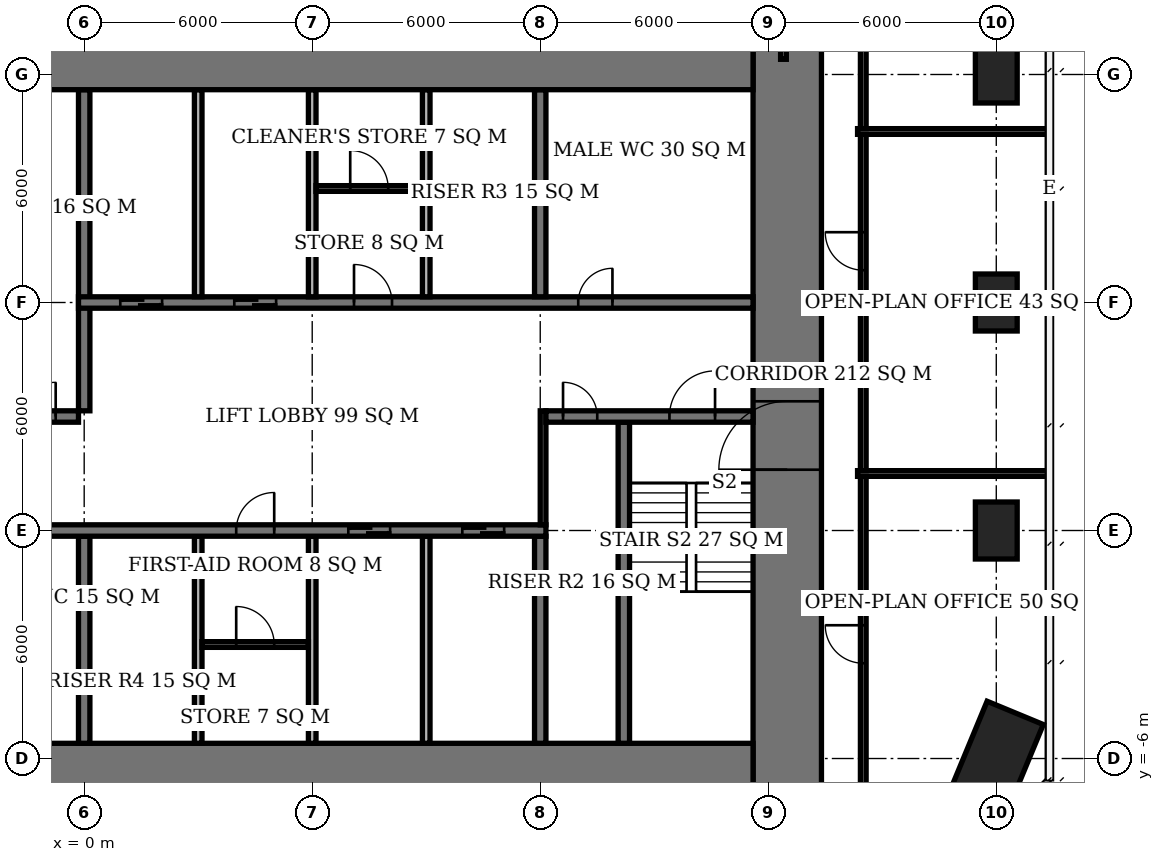
"""IFC4 building model, lengths in metres.
Left out: names, types, materials, properties, quantities, classifications, styles, units other than length and angle.
Written with IfcOpenShell. Run it as: python <this file> out.ifc"""

import sys

from ifc_helpers import new_model, si_unit, direction, frame, frame_2d, origin, origin_2d, place, context, subcontext, project, spatial, rectangle, extrude, element, fill, save


model = new_model("IFC4")
c1 = context("Model", 3, precision=1e-05, world=origin(), true_north=direction((0.0, 1.0)))
c2 = subcontext(c1, "Body", "Model", "MODEL_VIEW")
j1 = project(units=[si_unit("LENGTHUNIT", "METRE"), si_unit("PLANEANGLEUNIT", "RADIAN")], contexts=[c1])
p1 = place(None, origin())
s1 = spatial("IfcSite", under=j1, at=p1, CompositionType="ELEMENT")
p2 = place(p1, origin())
s2 = spatial("IfcBuilding", under=s1, at=p2, CompositionType="ELEMENT")
p3 = place(p2, frame((0.0, 0.0, 204.5)))
s3 = spatial("IfcBuildingStorey", under=s2, at=p3, CompositionType="ELEMENT", Elevation=204.5)
p4 = place(p3, frame((24.0, -6.0, 0.0), z_axis=(0.0, 0.0, 1.0), x_axis=(-0.382683432365, -0.923879532511, 0.0)))
e1 = element("IfcColumn", 1, at=p4, inside=s3, PredefinedType="COLUMN", context=c2, shape_type="SweptSolid", body=[
    extrude(rectangle(XDim=2.6, YDim=1.6, at=origin_2d()), origin(), (0.0, 0.0, 1.0), 3.9),
])
for number, where, z_axis, x_axis in (
    (2, (24.0, 0.0, 0.0), (0.0, 0.0, 1.0), (0.0, 1.0, 0.0)),
    (3, (24.0, 6.0, 0.0), (0.0, 0.0, 1.0), (0.0, 1.0, 0.0)),
    (4, (24.0, 12.0, 0.0), (0.0, 0.0, 1.0), (0.0, 1.0, 0.0)),
):
    element("IfcColumn", number, at=place(p3, frame(where, z_axis=z_axis, x_axis=x_axis)), inside=s3, PredefinedType="COLUMN", context=c2, shape_type="SweptSolid", body=[
        extrude(rectangle(XDim=1.5, YDim=1.1, at=origin_2d()), origin(), (0.0, 0.0, 1.0), 3.9),
    ])
for number, where, z_axis, x_axis in (
    (5, (-5.6, -6.6, 0.0), (0.0, 0.0, 1.0), (1.0, 0.0, 0.0)),
    (6, (-5.6, 12.6, 0.0), (0.0, 0.0, 1.0), (1.0, 0.0, 0.0)),
):
    element("IfcWall", number, at=place(p3, frame(where, z_axis=z_axis, x_axis=x_axis)), inside=s3, PredefinedType="SHEAR", context=c2, shape_type="SweptSolid", body=[
        extrude(rectangle(XDim=23.2, YDim=2.0, at=frame_2d((11.6, 0.0))), origin(), (0.0, 0.0, 1.0), 3.9),
    ])
p5 = place(p3, frame((18.5, -7.6, 0.0), z_axis=(0.0, 0.0, 1.0), x_axis=(0.0, 1.0, 0.0)))
e7 = element("IfcWall", 7, at=p5, inside=s3, PredefinedType="SHEAR", context=c2, shape_type="SweptSolid", body=[
    extrude(rectangle(XDim=21.2, YDim=1.8, at=frame_2d((10.6, 0.0))), origin(), (0.0, 0.0, 1.0), 3.9),
])
p6 = place(p5, frame((9.2, 0.0, 0.0)))
e8 = element("IfcOpeningElement", 8, at=p6, cuts=e7, PredefinedType="OPENING", context=c2, shape_type="SweptSolid", body=[
    extrude(rectangle(XDim=1.8, YDim=2.4, at=frame_2d((0.9, 1.2))), frame((0.0, 0.91, 0.0), z_axis=(0.0, -1.0, 0.0), x_axis=(1.0, 0.0, 0.0)), (0.0, 0.0, 1.0), 1.82),
])
p7 = place(p3, frame((-5.6, 0.0, 0.0), z_axis=(0.0, 0.0, 1.0), x_axis=(1.0, 0.0, 0.0)))
e9 = element("IfcWall", 9, at=p7, inside=s3, PredefinedType="SHEAR", context=c2, shape_type="SweptSolid", body=[
    extrude(rectangle(XDim=17.75, YDim=0.3, at=frame_2d((8.875, 0.0))), origin(), (0.0, 0.0, 1.0), 3.9),
])
p8 = place(p7, frame((0.6, 0.0, 0.0)))
e10 = element("IfcOpeningElement", 10, at=p8, cuts=e9, PredefinedType="OPENING", context=c2, shape_type="SweptSolid", body=[
    extrude(rectangle(XDim=0.9, YDim=2.1, at=frame_2d((0.45, 1.05))), frame((0.0, 0.16, 0.0), z_axis=(0.0, -1.0, 0.0), x_axis=(1.0, 0.0, 0.0)), (0.0, 0.0, 1.0), 0.32),
])
p9 = place(p7, frame((3.7, 0.0, 0.0)))
e11 = element("IfcOpeningElement", 11, at=p9, cuts=e9, PredefinedType="OPENING", context=c2, shape_type="SweptSolid", body=[
    extrude(rectangle(XDim=1.0, YDim=2.1, at=frame_2d((0.5, 1.05))), frame((0.0, 0.16, 0.0), z_axis=(0.0, -1.0, 0.0), x_axis=(1.0, 0.0, 0.0)), (0.0, 0.0, 1.0), 0.32),
])
p10 = place(p7, frame((9.6, 0.0, 0.0)))
e12 = element("IfcOpeningElement", 12, at=p10, cuts=e9, PredefinedType="OPENING", context=c2, shape_type="SweptSolid", body=[
    extrude(rectangle(XDim=1.0, YDim=2.1, at=frame_2d((0.5, 1.05))), frame((0.0, 0.16, 0.0), z_axis=(0.0, -1.0, 0.0), x_axis=(1.0, 0.0, 0.0)), (0.0, 0.0, 1.0), 0.32),
])
p11 = place(p7, frame((12.55, 0.0, 0.0)))
e13 = element("IfcOpeningElement", 13, at=p11, cuts=e9, PredefinedType="OPENING", context=c2, shape_type="SweptSolid", body=[
    extrude(rectangle(XDim=1.1, YDim=2.1, at=frame_2d((0.55, 1.05))), frame((0.0, 0.16, 0.0), z_axis=(0.0, -1.0, 0.0), x_axis=(1.0, 0.0, 0.0)), (0.0, 0.0, 1.0), 0.32),
])
p12 = place(p7, frame((15.55, 0.0, 0.0)))
e14 = element("IfcOpeningElement", 14, at=p12, cuts=e9, PredefinedType="OPENING", context=c2, shape_type="SweptSolid", body=[
    extrude(rectangle(XDim=1.1, YDim=2.1, at=frame_2d((0.55, 1.05))), frame((0.0, 0.16, 0.0), z_axis=(0.0, -1.0, 0.0), x_axis=(1.0, 0.0, 0.0)), (0.0, 0.0, 1.0), 0.32),
])
p13 = place(p3, frame((-5.6, 3.0, 0.0), z_axis=(0.0, 0.0, 1.0), x_axis=(1.0, 0.0, 0.0)))
e15 = element("IfcWall", 15, at=p13, inside=s3, PredefinedType="SHEAR", context=c2, shape_type="SweptSolid", body=[
    extrude(rectangle(XDim=5.45, YDim=0.3, at=frame_2d((2.725, 0.0))), origin(), (0.0, 0.0, 1.0), 3.9),
])
p14 = place(p13, frame((0.4, 0.0, 0.0)))
e16 = element("IfcOpeningElement", 16, at=p14, cuts=e15, PredefinedType="OPENING", context=c2, shape_type="SweptSolid", body=[
    extrude(rectangle(XDim=1.2, YDim=2.1, at=frame_2d((0.6, 1.05))), frame((0.0, 0.16, 0.0), z_axis=(0.0, -1.0, 0.0), x_axis=(1.0, 0.0, 0.0)), (0.0, 0.0, 1.0), 0.32),
])
p15 = place(p13, frame((3.95, 0.0, 0.0)))
e17 = element("IfcOpeningElement", 17, at=p15, cuts=e15, PredefinedType="OPENING", context=c2, shape_type="SweptSolid", body=[
    extrude(rectangle(XDim=0.9, YDim=2.1, at=frame_2d((0.45, 1.05))), frame((0.0, 0.16, 0.0), z_axis=(0.0, -1.0, 0.0), x_axis=(1.0, 0.0, 0.0)), (0.0, 0.0, 1.0), 0.32),
])
p16 = place(p3, frame((12.15, 3.0, 0.0), z_axis=(0.0, 0.0, 1.0), x_axis=(1.0, 0.0, 0.0)))
e18 = element("IfcWall", 18, at=p16, inside=s3, PredefinedType="SHEAR", context=c2, shape_type="SweptSolid", body=[
    extrude(rectangle(XDim=5.45, YDim=0.3, at=frame_2d((2.725, 0.0))), origin(), (0.0, 0.0, 1.0), 3.9),
])
p17 = place(p16, frame((3.25, 0.0, 0.0)))
e19 = element("IfcOpeningElement", 19, at=p17, cuts=e18, PredefinedType="OPENING", context=c2, shape_type="SweptSolid", body=[
    extrude(rectangle(XDim=1.2, YDim=2.1, at=frame_2d((0.6, 1.05))), frame((0.0, 0.16, 0.0), z_axis=(0.0, -1.0, 0.0), x_axis=(1.0, 0.0, 0.0)), (0.0, 0.0, 1.0), 0.32),
])
p18 = place(p16, frame((0.45, 0.0, 0.0)))
e20 = element("IfcOpeningElement", 20, at=p18, cuts=e18, PredefinedType="OPENING", context=c2, shape_type="SweptSolid", body=[
    extrude(rectangle(XDim=0.9, YDim=2.1, at=frame_2d((0.45, 1.05))), frame((0.0, 0.16, 0.0), z_axis=(0.0, -1.0, 0.0), x_axis=(1.0, 0.0, 0.0)), (0.0, 0.0, 1.0), 0.32),
])
p19 = place(p3, frame((-0.15, 6.0, 0.0), z_axis=(0.0, 0.0, 1.0), x_axis=(1.0, 0.0, 0.0)))
e21 = element("IfcWall", 21, at=p19, inside=s3, PredefinedType="SHEAR", context=c2, shape_type="SweptSolid", body=[
    extrude(rectangle(XDim=17.75, YDim=0.3, at=frame_2d((8.875, 0.0))), origin(), (0.0, 0.0, 1.0), 3.9),
])
p20 = place(p19, frame((13.15, 0.0, 0.0)))
e22 = element("IfcOpeningElement", 22, at=p20, cuts=e21, PredefinedType="OPENING", context=c2, shape_type="SweptSolid", body=[
    extrude(rectangle(XDim=0.9, YDim=2.1, at=frame_2d((0.45, 1.05))), frame((0.0, 0.16, 0.0), z_axis=(0.0, -1.0, 0.0), x_axis=(1.0, 0.0, 0.0)), (0.0, 0.0, 1.0), 0.32),
])
p21 = place(p19, frame((7.25, 0.0, 0.0)))
e23 = element("IfcOpeningElement", 23, at=p21, cuts=e21, PredefinedType="OPENING", context=c2, shape_type="SweptSolid", body=[
    extrude(rectangle(XDim=1.0, YDim=2.1, at=frame_2d((0.5, 1.05))), frame((0.0, 0.16, 0.0), z_axis=(0.0, -1.0, 0.0), x_axis=(1.0, 0.0, 0.0)), (0.0, 0.0, 1.0), 0.32),
])
p22 = place(p19, frame((1.1, 0.0, 0.0)))
e24 = element("IfcOpeningElement", 24, at=p22, cuts=e21, PredefinedType="OPENING", context=c2, shape_type="SweptSolid", body=[
    extrude(rectangle(XDim=1.1, YDim=2.1, at=frame_2d((0.55, 1.05))), frame((0.0, 0.16, 0.0), z_axis=(0.0, -1.0, 0.0), x_axis=(1.0, 0.0, 0.0)), (0.0, 0.0, 1.0), 0.32),
])
p23 = place(p19, frame((4.1, 0.0, 0.0)))
e25 = element("IfcOpeningElement", 25, at=p23, cuts=e21, PredefinedType="OPENING", context=c2, shape_type="SweptSolid", body=[
    extrude(rectangle(XDim=1.1, YDim=2.1, at=frame_2d((0.55, 1.05))), frame((0.0, 0.16, 0.0), z_axis=(0.0, -1.0, 0.0), x_axis=(1.0, 0.0, 0.0)), (0.0, 0.0, 1.0), 0.32),
])
p24 = place(p3, frame((0.0, -5.6, 0.0), z_axis=(0.0, 0.0, 1.0), x_axis=(0.0, 1.0, 0.0)))
e26 = element("IfcWall", 26, at=p24, inside=s3, PredefinedType="SHEAR", context=c2, shape_type="SweptSolid", body=[
    extrude(rectangle(XDim=5.45, YDim=0.3, at=frame_2d((2.725, 0.0))), origin(), (0.0, 0.0, 1.0), 3.9),
])
p25 = place(p3, frame((0.0, 3.15, 0.0), z_axis=(0.0, 0.0, 1.0), x_axis=(0.0, 1.0, 0.0)))
e27 = element("IfcWall", 27, at=p25, inside=s3, PredefinedType="SHEAR", context=c2, shape_type="SweptSolid", body=[
    extrude(rectangle(XDim=8.45, YDim=0.3, at=frame_2d((4.225, 0.0))), origin(), (0.0, 0.0, 1.0), 3.9),
])
for number, where, z_axis, x_axis in (
    (28, (12.0, -5.6, 0.0), (0.0, 0.0, 1.0), (0.0, 1.0, 0.0)),
    (29, (12.0, 6.15, 0.0), (0.0, 0.0, 1.0), (0.0, 1.0, 0.0)),
):
    element("IfcWall", number, at=place(p3, frame(where, z_axis=z_axis, x_axis=x_axis)), inside=s3, PredefinedType="SHEAR", context=c2, shape_type="SweptSolid", body=[
        extrude(rectangle(XDim=5.45, YDim=0.3, at=frame_2d((2.725, 0.0))), origin(), (0.0, 0.0, 1.0), 3.9),
    ])
p26 = place(p3, frame((14.2, -5.6, 0.0), z_axis=(0.0, 0.0, 1.0), x_axis=(0.0, 1.0, 0.0)))
e30 = element("IfcWall", 30, at=p26, inside=s3, PredefinedType="SHEAR", context=c2, shape_type="SweptSolid", body=[
    extrude(rectangle(XDim=8.45, YDim=0.3, at=frame_2d((4.225, 0.0))), origin(), (0.0, 0.0, 1.0), 3.9),
])
for number, where, z_axis, x_axis in (
    (31, (3.0, 6.15, 0.0), (0.0, 0.0, 1.0), (0.0, 1.0, 0.0)),
    (32, (6.0, 6.15, 0.0), (0.0, 0.0, 1.0), (0.0, 1.0, 0.0)),
    (33, (9.0, 6.15, 0.0), (0.0, 0.0, 1.0), (0.0, 1.0, 0.0)),
    (34, (3.0, -5.6, 0.0), (0.0, 0.0, 1.0), (0.0, 1.0, 0.0)),
    (35, (6.0, -5.6, 0.0), (0.0, 0.0, 1.0), (0.0, 1.0, 0.0)),
    (36, (9.0, -5.6, 0.0), (0.0, 0.0, 1.0), (0.0, 1.0, 0.0)),
):
    element("IfcWall", number, at=place(p3, frame(where, z_axis=z_axis, x_axis=x_axis)), inside=s3, PredefinedType="SOLIDWALL", context=c2, shape_type="SweptSolid", body=[
        extrude(rectangle(XDim=5.45, YDim=0.2, at=frame_2d((2.725, 0.0))), origin(), (0.0, 0.0, 1.0), 3.9),
    ])
p27 = place(p3, frame((6.1, 9.0, 0.0), z_axis=(0.0, 0.0, 1.0), x_axis=(1.0, 0.0, 0.0)))
e37 = element("IfcWall", 37, at=p27, inside=s3, PredefinedType="PARTITIONING", context=c2, shape_type="SweptSolid", body=[
    extrude(rectangle(XDim=2.8, YDim=0.15, at=frame_2d((1.4, 0.0))), origin(), (0.0, 0.0, 1.0), 3.65),
])
p28 = place(p27, frame((0.9, 0.0, 0.0)))
e38 = element("IfcOpeningElement", 38, at=p28, cuts=e37, PredefinedType="OPENING", context=c2, shape_type="SweptSolid", body=[
    extrude(rectangle(XDim=1.0, YDim=2.1, at=frame_2d((0.5, 1.05))), frame((0.0, 0.085, 0.0), z_axis=(0.0, -1.0, 0.0), x_axis=(1.0, 0.0, 0.0)), (0.0, 0.0, 1.0), 0.17),
])
p29 = place(p3, frame((3.1, -3.0, 0.0), z_axis=(0.0, 0.0, 1.0), x_axis=(1.0, 0.0, 0.0)))
e39 = element("IfcWall", 39, at=p29, inside=s3, PredefinedType="PARTITIONING", context=c2, shape_type="SweptSolid", body=[
    extrude(rectangle(XDim=2.8, YDim=0.15, at=frame_2d((1.4, 0.0))), origin(), (0.0, 0.0, 1.0), 3.65),
])
p30 = place(p29, frame((0.9, 0.0, 0.0)))
e40 = element("IfcOpeningElement", 40, at=p30, cuts=e39, PredefinedType="OPENING", context=c2, shape_type="SweptSolid", body=[
    extrude(rectangle(XDim=1.0, YDim=2.1, at=frame_2d((0.5, 1.05))), frame((0.0, 0.085, 0.0), z_axis=(0.0, -1.0, 0.0), x_axis=(1.0, 0.0, 0.0)), (0.0, 0.0, 1.0), 0.17),
])
p31 = place(p3, frame((10.5, 12.4, 0.0), z_axis=(0.0, 0.0, 1.0), x_axis=(0.0, 1.0, 0.0)))
e41 = element("IfcWall", 41, at=p31, inside=s3, PredefinedType="PARTITIONING", context=c2, shape_type="SweptSolid", body=[
    extrude(rectangle(XDim=7.025, YDim=0.15, at=frame_2d((3.513, 0.0))), origin(), (0.0, 0.0, 1.0), 3.65),
])
p32 = place(p3, frame((18.4, 12.4, 0.0), z_axis=(0.0, 0.0, 1.0), x_axis=(0.0, 1.0, 0.0)))
e42 = element("IfcWall", 42, at=p32, inside=s3, PredefinedType="PARTITIONING", context=c2, shape_type="SweptSolid", body=[
    extrude(rectangle(XDim=1.2, YDim=0.15, at=frame_2d((0.6, 0.0))), origin(), (0.0, 0.0, 1.0), 3.65),
])
p33 = place(p3, frame((20.5, -11.388, 0.0), z_axis=(0.0, 0.0, 1.0), x_axis=(0.0, 1.0, 0.0)))
e43 = element("IfcWall", 43, at=p33, inside=s3, PredefinedType="PARTITIONING", context=c2, shape_type="SweptSolid", body=[
    extrude(rectangle(XDim=12.813, YDim=0.15, at=frame_2d((6.406, 0.0))), origin(), (0.0, 0.0, 1.0), 3.65),
])
p34 = place(p33, frame((7.895, 0.0, 0.0)))
e44 = element("IfcOpeningElement", 44, at=p34, cuts=e43, PredefinedType="OPENING", context=c2, shape_type="SweptSolid", body=[
    extrude(rectangle(XDim=1.0, YDim=2.1, at=frame_2d((0.5, 1.05))), frame((0.0, 0.085, 0.0), z_axis=(0.0, -1.0, 0.0), x_axis=(1.0, 0.0, 0.0)), (0.0, 0.0, 1.0), 0.17),
])
p35 = place(p3, frame((20.5, 1.575, 0.0), z_axis=(0.0, 0.0, 1.0), x_axis=(0.0, 1.0, 0.0)))
e45 = element("IfcWall", 45, at=p35, inside=s3, PredefinedType="PARTITIONING", context=c2, shape_type="SweptSolid", body=[
    extrude(rectangle(XDim=8.85, YDim=0.15, at=frame_2d((4.425, 0.0))), origin(), (0.0, 0.0, 1.0), 3.65),
])
p36 = place(p35, frame((5.275, 0.0, 0.0)))
e46 = element("IfcOpeningElement", 46, at=p36, cuts=e45, PredefinedType="OPENING", context=c2, shape_type="SweptSolid", body=[
    extrude(rectangle(XDim=1.0, YDim=2.1, at=frame_2d((0.5, 1.05))), frame((0.0, 0.085, 0.0), z_axis=(0.0, -1.0, 0.0), x_axis=(1.0, 0.0, 0.0)), (0.0, 0.0, 1.0), 0.17),
])
p37 = place(p3, frame((20.35, 1.5, 0.0), z_axis=(0.0, 0.0, 1.0), x_axis=(1.0, 0.0, 0.0)))
e47 = element("IfcWall", 47, at=p37, inside=s3, PredefinedType="PARTITIONING", context=c2, shape_type="SweptSolid", body=[
    extrude(rectangle(XDim=5.05, YDim=0.15, at=frame_2d((2.525, 0.0))), origin(), (0.0, 0.0, 1.0), 3.65),
])
p38 = place(p3, frame((20.5, 10.575, 0.0), z_axis=(0.0, 0.0, 1.0), x_axis=(0.0, 1.0, 0.0)))
e48 = element("IfcWall", 48, at=p38, inside=s3, PredefinedType="PARTITIONING", context=c2, shape_type="SweptSolid", body=[
    extrude(rectangle(XDim=12.715, YDim=0.15, at=frame_2d((6.357, 0.0))), origin(), (0.0, 0.0, 1.0), 3.65),
])
p39 = place(p38, frame((11.415, 0.0, 0.0)))
e49 = element("IfcOpeningElement", 49, at=p39, cuts=e48, PredefinedType="OPENING", context=c2, shape_type="SweptSolid", body=[
    extrude(rectangle(XDim=1.0, YDim=2.1, at=frame_2d((0.5, 1.05))), frame((0.0, 0.085, 0.0), z_axis=(0.0, -1.0, 0.0), x_axis=(1.0, 0.0, 0.0)), (0.0, 0.0, 1.0), 0.17),
])
p40 = place(p3, frame((20.35, 10.5, 0.0), z_axis=(0.0, 0.0, 1.0), x_axis=(1.0, 0.0, 0.0)))
e50 = element("IfcWall", 50, at=p40, inside=s3, PredefinedType="PARTITIONING", context=c2, shape_type="SweptSolid", body=[
    extrude(rectangle(XDim=5.05, YDim=0.15, at=frame_2d((2.525, 0.0))), origin(), (0.0, 0.0, 1.0), 3.65),
])
p41 = place(p3, frame((12.075, 0.15, 0.0), z_axis=(0.0, 0.0, 1.0), x_axis=(0.0, 1.0, 0.0)))
e51 = element("IfcWall", 51, at=p41, inside=s3, PredefinedType="PARTITIONING", context=c2, shape_type="SweptSolid", body=[
    extrude(rectangle(XDim=3.0, YDim=0.15, at=frame_2d((1.5, 0.0))), origin(), (0.0, 0.0, 1.0), 3.65),
])
p42 = place(p6, origin())
e52 = element("IfcDoor", 52, at=p42, inside=s3, OperationType="DOUBLE_DOOR_SINGLE_SWING", PredefinedType="DOOR", context=c2, shape_type="SweptSolid", body=[
    extrude(rectangle(XDim=1.8, YDim=2.4, at=frame_2d((0.9, 1.2))), frame((0.0, 0.025, 0.0), z_axis=(0.0, -1.0, 0.0), x_axis=(1.0, 0.0, 0.0)), (0.0, 0.0, 1.0), 0.05),
])
fill(e8, e52)
p43 = place(p15, origin())
e53 = element("IfcDoor", 53, at=p43, inside=s3, OperationType="SINGLE_SWING_RIGHT", PredefinedType="DOOR", context=c2, shape_type="SweptSolid", body=[
    extrude(rectangle(XDim=0.9, YDim=2.1, at=frame_2d((0.45, 1.05))), frame((0.0, 0.025, 0.0), z_axis=(0.0, -1.0, 0.0), x_axis=(1.0, 0.0, 0.0)), (0.0, 0.0, 1.0), 0.05),
])
fill(e17, e53)
p44 = place(p17, origin())
e54 = element("IfcDoor", 54, at=p44, inside=s3, OperationType="SINGLE_SWING_RIGHT", PredefinedType="DOOR", context=c2, shape_type="SweptSolid", body=[
    extrude(rectangle(XDim=1.2, YDim=2.1, at=frame_2d((0.6, 1.05))), frame((0.0, 0.025, 0.0), z_axis=(0.0, -1.0, 0.0), x_axis=(1.0, 0.0, 0.0)), (0.0, 0.0, 1.0), 0.05),
])
fill(e19, e54)
p45 = place(p18, origin())
e55 = element("IfcDoor", 55, at=p45, inside=s3, OperationType="SINGLE_SWING_LEFT", PredefinedType="DOOR", context=c2, shape_type="SweptSolid", body=[
    extrude(rectangle(XDim=0.9, YDim=2.1, at=frame_2d((0.45, 1.05))), frame((0.0, 0.025, 0.0), z_axis=(0.0, -1.0, 0.0), x_axis=(1.0, 0.0, 0.0)), (0.0, 0.0, 1.0), 0.05),
])
fill(e20, e55)
p46 = place(p20, origin())
e56 = element("IfcDoor", 56, at=p46, inside=s3, OperationType="SINGLE_SWING_RIGHT", PredefinedType="DOOR", context=c2, shape_type="SweptSolid", body=[
    extrude(rectangle(XDim=0.9, YDim=2.1, at=frame_2d((0.45, 1.05))), frame((0.0, 0.025, 0.0), z_axis=(0.0, -1.0, 0.0), x_axis=(1.0, 0.0, 0.0)), (0.0, 0.0, 1.0), 0.05),
])
fill(e22, e56)
p47 = place(p28, origin())
e57 = element("IfcDoor", 57, at=p47, inside=s3, OperationType="SINGLE_SWING_LEFT", PredefinedType="DOOR", context=c2, shape_type="SweptSolid", body=[
    extrude(rectangle(XDim=1.0, YDim=2.1, at=frame_2d((0.5, 1.05))), frame((0.0, 0.025, 0.0), z_axis=(0.0, -1.0, 0.0), x_axis=(1.0, 0.0, 0.0)), (0.0, 0.0, 1.0), 0.05),
])
fill(e38, e57)
p48 = place(p21, origin())
e58 = element("IfcDoor", 58, at=p48, inside=s3, OperationType="SINGLE_SWING_LEFT", PredefinedType="DOOR", context=c2, shape_type="SweptSolid", body=[
    extrude(rectangle(XDim=1.0, YDim=2.1, at=frame_2d((0.5, 1.05))), frame((0.0, 0.025, 0.0), z_axis=(0.0, -1.0, 0.0), x_axis=(1.0, 0.0, 0.0)), (0.0, 0.0, 1.0), 0.05),
])
fill(e23, e58)
p49 = place(p30, origin())
e59 = element("IfcDoor", 59, at=p49, inside=s3, OperationType="SINGLE_SWING_LEFT", PredefinedType="DOOR", context=c2, shape_type="SweptSolid", body=[
    extrude(rectangle(XDim=1.0, YDim=2.1, at=frame_2d((0.5, 1.05))), frame((0.0, 0.025, 0.0), z_axis=(0.0, -1.0, 0.0), x_axis=(1.0, 0.0, 0.0)), (0.0, 0.0, 1.0), 0.05),
])
fill(e40, e59)
p50 = place(p10, origin())
e60 = element("IfcDoor", 60, at=p50, inside=s3, OperationType="SINGLE_SWING_RIGHT", PredefinedType="DOOR", context=c2, shape_type="SweptSolid", body=[
    extrude(rectangle(XDim=1.0, YDim=2.1, at=frame_2d((0.5, 1.05))), frame((0.0, 0.025, 0.0), z_axis=(0.0, -1.0, 0.0), x_axis=(1.0, 0.0, 0.0)), (0.0, 0.0, 1.0), 0.05),
])
fill(e12, e60)
p51 = place(p22, origin())
e61 = element("IfcDoor", 61, at=p51, inside=s3, OperationType="DOUBLE_DOOR_SLIDING", PredefinedType="USERDEFINED", context=c2, shape_type="SweptSolid", body=[
    extrude(rectangle(XDim=1.1, YDim=2.1, at=frame_2d((0.55, 1.05))), frame((0.0, 0.025, 0.0), z_axis=(0.0, -1.0, 0.0), x_axis=(1.0, 0.0, 0.0)), (0.0, 0.0, 1.0), 0.05),
])
fill(e24, e61)
p52 = place(p23, origin())
e62 = element("IfcDoor", 62, at=p52, inside=s3, OperationType="DOUBLE_DOOR_SLIDING", PredefinedType="USERDEFINED", context=c2, shape_type="SweptSolid", body=[
    extrude(rectangle(XDim=1.1, YDim=2.1, at=frame_2d((0.55, 1.05))), frame((0.0, 0.025, 0.0), z_axis=(0.0, -1.0, 0.0), x_axis=(1.0, 0.0, 0.0)), (0.0, 0.0, 1.0), 0.05),
])
fill(e25, e62)
p53 = place(p11, origin())
e63 = element("IfcDoor", 63, at=p53, inside=s3, OperationType="DOUBLE_DOOR_SLIDING", PredefinedType="USERDEFINED", context=c2, shape_type="SweptSolid", body=[
    extrude(rectangle(XDim=1.1, YDim=2.1, at=frame_2d((0.55, 1.05))), frame((0.0, 0.025, 0.0), z_axis=(0.0, -1.0, 0.0), x_axis=(1.0, 0.0, 0.0)), (0.0, 0.0, 1.0), 0.05),
])
fill(e13, e63)
p54 = place(p12, origin())
e64 = element("IfcDoor", 64, at=p54, inside=s3, OperationType="DOUBLE_DOOR_SLIDING", PredefinedType="USERDEFINED", context=c2, shape_type="SweptSolid", body=[
    extrude(rectangle(XDim=1.1, YDim=2.1, at=frame_2d((0.55, 1.05))), frame((0.0, 0.025, 0.0), z_axis=(0.0, -1.0, 0.0), x_axis=(1.0, 0.0, 0.0)), (0.0, 0.0, 1.0), 0.05),
])
fill(e14, e64)
p55 = place(p34, origin())
e65 = element("IfcDoor", 65, at=p55, inside=s3, OperationType="SINGLE_SWING_RIGHT", PredefinedType="DOOR", context=c2, shape_type="SweptSolid", body=[
    extrude(rectangle(XDim=1.0, YDim=2.1, at=frame_2d((0.5, 1.05))), frame((0.0, 0.025, 0.0), z_axis=(0.0, -1.0, 0.0), x_axis=(1.0, 0.0, 0.0)), (0.0, 0.0, 1.0), 0.05),
])
fill(e44, e65)
p56 = place(p36, origin())
e66 = element("IfcDoor", 66, at=p56, inside=s3, OperationType="SINGLE_SWING_RIGHT", PredefinedType="DOOR", context=c2, shape_type="SweptSolid", body=[
    extrude(rectangle(XDim=1.0, YDim=2.1, at=frame_2d((0.5, 1.05))), frame((0.0, 0.025, 0.0), z_axis=(0.0, -1.0, 0.0), x_axis=(1.0, 0.0, 0.0)), (0.0, 0.0, 1.0), 0.05),
])
fill(e46, e66)
save(model, sys.argv[1])
